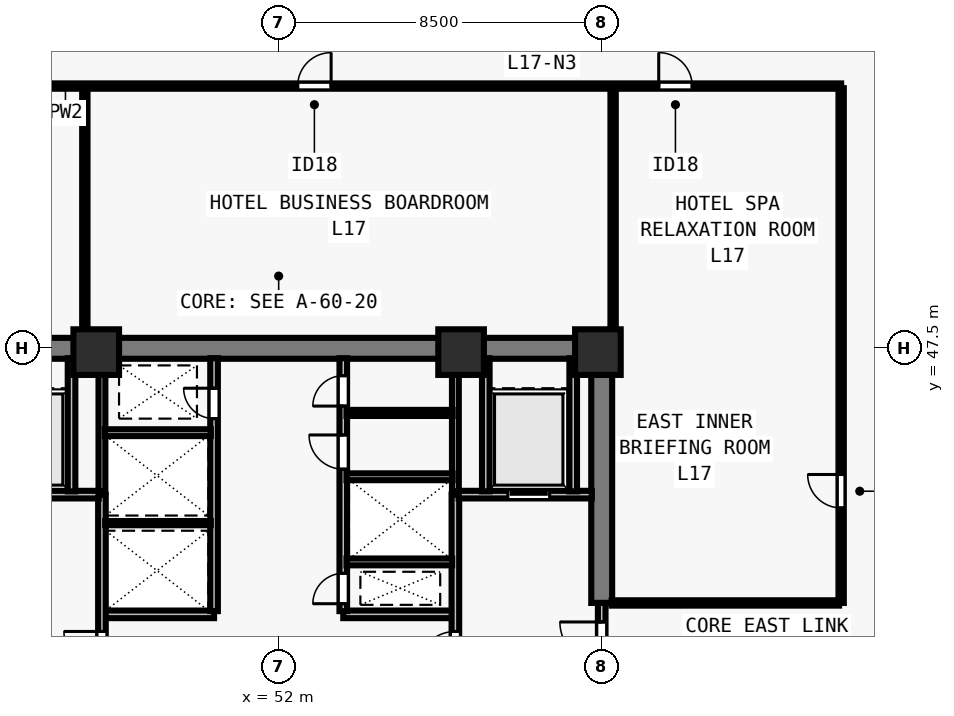
"""IFC4 building model, lengths in metres.
Left out: names, types, materials, properties, quantities, classifications, styles, units other than length and angle.
Written with IfcOpenShell. Run it as: python <this file> out.ifc"""

import sys

from ifc_helpers import new_model, si_unit, direction, frame, frame_2d, origin, origin_2d, place, context, subcontext, project, spatial, rectangle, extrude, element, fill, save


model = new_model("IFC4")
c1 = context("Model", 3, precision=1e-05, world=origin(), true_north=direction((0.0, 1.0)))
c2 = subcontext(c1, "Body", "Model", "MODEL_VIEW")
j1 = project(units=[si_unit("LENGTHUNIT", "METRE"), si_unit("PLANEANGLEUNIT", "RADIAN")], contexts=[c1])
p1 = place(None, origin())
s1 = spatial("IfcSite", under=j1, at=p1, CompositionType="ELEMENT")
p2 = place(p1, origin())
s2 = spatial("IfcBuilding", under=s1, at=p2, CompositionType="ELEMENT")
p3 = place(p2, frame((0.0, 0.0, 65.5)))
s3 = spatial("IfcBuildingStorey", under=s2, at=p3, CompositionType="ELEMENT", Elevation=65.5)
for number, where, z_axis, x_axis in (
    (1, (47.2, 47.4, 0.0), (0.0, 0.0, 1.0), (1.0, 0.0, 0.0)),
    (2, (56.8, 47.4, 0.0), (0.0, 0.0, 1.0), (1.0, 0.0, 0.0)),
    (3, (60.4, 47.4, 0.0), (0.0, 0.0, 1.0), (1.0, 0.0, 0.0)),
):
    element("IfcColumn", number, at=place(p3, frame(where, z_axis=z_axis, x_axis=x_axis)), inside=s3, PredefinedType="COLUMN", context=c2, shape_type="SweptSolid", body=[
        extrude(rectangle(XDim=1.2, YDim=1.2, at=origin_2d()), origin(), (0.0, 0.0, 1.0), 3.5),
    ])
p4 = place(p3, frame((43.225, 47.5, 0.0), z_axis=(0.0, 0.0, 1.0), x_axis=(1.0, 0.0, 0.0)))
e4 = element("IfcWall", 4, at=p4, inside=s3, PredefinedType="SHEAR", context=c2, shape_type="SweptSolid", body=[
    extrude(rectangle(XDim=17.55, YDim=0.55, at=frame_2d((8.775, 0.0))), origin(), (0.0, 0.0, 1.0), 3.28),
])
p5 = place(p3, frame((60.5, 40.8, 0.0), z_axis=(0.0, 0.0, 1.0), x_axis=(0.0, 1.0, 0.0)))
e5 = element("IfcWall", 5, at=p5, inside=s3, PredefinedType="SHEAR", context=c2, shape_type="SweptSolid", body=[
    extrude(rectangle(XDim=6.435, YDim=0.55, at=frame_2d((3.218, 0.0))), origin(), (0.0, 0.0, 1.0), 3.28),
])
for number, where, z_axis, x_axis in (
    (6, (47.35, 40.5, 0.0), (0.0, 0.0, 1.0), (1.0, 0.0, 0.0)),
    (7, (53.7, 40.5, 0.0), (0.0, 0.0, 1.0), (1.0, 0.0, 0.0)),
):
    element("IfcWall", number, at=place(p3, frame(where, z_axis=z_axis, x_axis=x_axis)), inside=s3, PredefinedType="SOLIDWALL", context=c2, shape_type="SweptSolid", body=[
        extrude(rectangle(XDim=2.95, YDim=0.2, at=frame_2d((1.475, 0.0))), origin(), (0.0, 0.0, 1.0), 3.28),
    ])
p6 = place(p3, frame((50.3, 40.585, 0.0), z_axis=(0.0, 0.0, 1.0), x_axis=(0.0, 1.0, 0.0)))
e8 = element("IfcWall", 8, at=p6, inside=s3, PredefinedType="SOLIDWALL", context=c2, shape_type="SweptSolid", body=[
    extrude(rectangle(XDim=6.655, YDim=0.2, at=frame_2d((3.328, 0.0))), origin(), (0.0, 0.0, 1.0), 3.28),
])
p7 = place(p6, frame((5.065, 0.0, 0.0)))
e9 = element("IfcOpeningElement", 9, at=p7, cuts=e8, PredefinedType="OPENING", context=c2, shape_type="SweptSolid", body=[
    extrude(rectangle(XDim=0.8, YDim=2.08, at=frame_2d((0.4, 1.04))), frame((0.0, 0.11, 0.0), z_axis=(0.0, -1.0, 0.0), x_axis=(1.0, 0.0, 0.0)), (0.0, 0.0, 1.0), 0.22),
])
p8 = place(p3, frame((53.7, 40.585, 0.0), z_axis=(0.0, 0.0, 1.0), x_axis=(0.0, 1.0, 0.0)))
e10 = element("IfcWall", 10, at=p8, inside=s3, PredefinedType="SOLIDWALL", context=c2, shape_type="SweptSolid", body=[
    extrude(rectangle(XDim=6.655, YDim=0.2, at=frame_2d((3.328, 0.0))), origin(), (0.0, 0.0, 1.0), 3.28),
])
p9 = place(p8, frame((0.195, 0.0, 0.0)))
e11 = element("IfcOpeningElement", 11, at=p9, cuts=e10, PredefinedType="OPENING", context=c2, shape_type="SweptSolid", body=[
    extrude(rectangle(XDim=0.8, YDim=2.08, at=frame_2d((0.4, 1.04))), frame((0.0, 0.11, 0.0), z_axis=(0.0, -1.0, 0.0), x_axis=(1.0, 0.0, 0.0)), (0.0, 0.0, 1.0), 0.22),
])
p10 = place(p8, frame((3.735, 0.0, 0.0)))
e12 = element("IfcOpeningElement", 12, at=p10, cuts=e10, PredefinedType="OPENING", context=c2, shape_type="SweptSolid", body=[
    extrude(rectangle(XDim=0.9, YDim=2.12, at=frame_2d((0.45, 1.06))), frame((0.0, 0.11, 0.0), z_axis=(0.0, -1.0, 0.0), x_axis=(1.0, 0.0, 0.0)), (0.0, 0.0, 1.0), 0.22),
])
p11 = place(p8, frame((5.395, 0.0, 0.0)))
e13 = element("IfcOpeningElement", 13, at=p11, cuts=e10, PredefinedType="OPENING", context=c2, shape_type="SweptSolid", body=[
    extrude(rectangle(XDim=0.8, YDim=2.1, at=frame_2d((0.4, 1.05))), frame((0.0, 0.11, 0.0), z_axis=(0.0, -1.0, 0.0), x_axis=(1.0, 0.0, 0.0)), (0.0, 0.0, 1.0), 0.22),
])
p12 = place(p3, frame((47.35, 38.785, 0.0), z_axis=(0.0, 0.0, 1.0), x_axis=(0.0, 1.0, 0.0)))
e14 = element("IfcWall", 14, at=p12, inside=s3, PredefinedType="SOLIDWALL", context=c2, shape_type="SweptSolid", body=[
    extrude(rectangle(XDim=4.865, YDim=0.2, at=frame_2d((2.433, 0.0))), origin(), (0.0, 0.0, 1.0), 3.28),
])
p13 = place(p12, frame((0.265, 0.0, 0.0)))
e15 = element("IfcOpeningElement", 15, at=p13, cuts=e14, PredefinedType="OPENING", context=c2, shape_type="SweptSolid", body=[
    extrude(rectangle(XDim=1.0, YDim=2.15, at=frame_2d((0.5, 1.075))), frame((0.0, 0.11, 0.0), z_axis=(0.0, -1.0, 0.0), x_axis=(1.0, 0.0, 0.0)), (0.0, 0.0, 1.0), 0.22),
])
p14 = place(p3, frame((43.76, 43.65, 0.0), z_axis=(0.0, 0.0, 1.0), x_axis=(1.0, 0.0, 0.0)))
e16 = element("IfcWall", 16, at=p14, inside=s3, PredefinedType="SOLIDWALL", context=c2, shape_type="SweptSolid", body=[
    extrude(rectangle(XDim=3.505, YDim=0.2, at=frame_2d((1.752, 0.0))), origin(), (0.0, 0.0, 1.0), 3.28),
])
p15 = place(p14, frame((1.11, 0.0, 0.0)))
e17 = element("IfcOpeningElement", 17, at=p15, cuts=e16, PredefinedType="OPENING", context=c2, shape_type="SweptSolid", body=[
    extrude(rectangle(XDim=1.1, YDim=2.2, at=frame_2d((0.55, 1.1))), frame((0.0, 0.11, 0.0), z_axis=(0.0, -1.0, 0.0), x_axis=(1.0, 0.0, 0.0)), (0.0, 0.0, 1.0), 0.22),
])
p16 = place(p3, frame((46.55, 43.735, 0.0), z_axis=(0.0, 0.0, 1.0), x_axis=(0.0, 1.0, 0.0)))
e18 = element("IfcWall", 18, at=p16, inside=s3, PredefinedType="SOLIDWALL", context=c2, shape_type="SweptSolid", body=[
    extrude(rectangle(XDim=3.505, YDim=0.2, at=frame_2d((1.752, 0.0))), origin(), (0.0, 0.0, 1.0), 3.28),
])
p17 = place(p3, frame((60.5, 38.75, 0.0), z_axis=(0.0, 0.0, 1.0), x_axis=(0.0, 1.0, 0.0)))
e19 = element("IfcWall", 19, at=p17, inside=s3, PredefinedType="SOLIDWALL", context=c2, shape_type="SweptSolid", body=[
    extrude(rectangle(XDim=2.05, YDim=0.2, at=frame_2d((1.025, 0.0))), origin(), (0.0, 0.0, 1.0), 3.28),
])
p18 = place(p17, frame((0.45, 0.0, 0.0)))
e20 = element("IfcOpeningElement", 20, at=p18, cuts=e19, PredefinedType="OPENING", context=c2, shape_type="SweptSolid", body=[
    extrude(rectangle(XDim=1.1, YDim=2.15, at=frame_2d((0.55, 1.075))), frame((0.0, 0.11, 0.0), z_axis=(0.0, -1.0, 0.0), x_axis=(1.0, 0.0, 0.0)), (0.0, 0.0, 1.0), 0.22),
])
p19 = place(p3, frame((56.65, 38.785, 0.0), z_axis=(0.0, 0.0, 1.0), x_axis=(0.0, 1.0, 0.0)))
e21 = element("IfcWall", 21, at=p19, inside=s3, PredefinedType="SOLIDWALL", context=c2, shape_type="SweptSolid", body=[
    extrude(rectangle(XDim=4.865, YDim=0.2, at=frame_2d((2.433, 0.0))), origin(), (0.0, 0.0, 1.0), 3.28),
])
p20 = place(p19, frame((0.265, 0.0, 0.0)))
e22 = element("IfcOpeningElement", 22, at=p20, cuts=e21, PredefinedType="OPENING", context=c2, shape_type="SweptSolid", body=[
    extrude(rectangle(XDim=1.0, YDim=2.15, at=frame_2d((0.5, 1.075))), frame((0.0, 0.11, 0.0), z_axis=(0.0, -1.0, 0.0), x_axis=(1.0, 0.0, 0.0)), (0.0, 0.0, 1.0), 0.22),
])
p21 = place(p3, frame((56.735, 43.65, 0.0), z_axis=(0.0, 0.0, 1.0), x_axis=(1.0, 0.0, 0.0)))
e23 = element("IfcWall", 23, at=p21, inside=s3, PredefinedType="SOLIDWALL", context=c2, shape_type="SweptSolid", body=[
    extrude(rectangle(XDim=3.505, YDim=0.2, at=frame_2d((1.752, 0.0))), origin(), (0.0, 0.0, 1.0), 3.28),
])
p22 = place(p21, frame((1.295, 0.0, 0.0)))
e24 = element("IfcOpeningElement", 24, at=p22, cuts=e23, PredefinedType="OPENING", context=c2, shape_type="SweptSolid", body=[
    extrude(rectangle(XDim=1.1, YDim=2.2, at=frame_2d((0.55, 1.1))), frame((0.0, 0.11, 0.0), z_axis=(0.0, -1.0, 0.0), x_axis=(1.0, 0.0, 0.0)), (0.0, 0.0, 1.0), 0.22),
])
for number, where, z_axis, x_axis in (
    (25, (57.45, 43.735, 0.0), (0.0, 0.0, 1.0), (0.0, 1.0, 0.0)),
    (26, (59.75, 43.735, 0.0), (0.0, 0.0, 1.0), (0.0, 1.0, 0.0)),
):
    element("IfcWall", number, at=place(p3, frame(where, z_axis=z_axis, x_axis=x_axis)), inside=s3, PredefinedType="SOLIDWALL", context=c2, shape_type="SweptSolid", body=[
        extrude(rectangle(XDim=3.505, YDim=0.2, at=frame_2d((1.752, 0.0))), origin(), (0.0, 0.0, 1.0), 3.28),
    ])
p23 = place(p3, frame((47.35, 43.735, 0.0), z_axis=(0.0, 0.0, 1.0), x_axis=(0.0, 1.0, 0.0)))
e27 = element("IfcWall", 27, at=p23, inside=s3, PredefinedType="SOLIDWALL", context=c2, shape_type="SweptSolid", body=[
    extrude(rectangle(XDim=3.505, YDim=0.18, at=frame_2d((1.752, 0.0))), origin(), (0.0, 0.0, 1.0), 3.28),
])
p24 = place(p3, frame((47.435, 42.9, 0.0), z_axis=(0.0, 0.0, 1.0), x_axis=(1.0, 0.0, 0.0)))
e28 = element("IfcWall", 28, at=p24, inside=s3, PredefinedType="PARTITIONING", context=c2, shape_type="SweptSolid", body=[
    extrude(rectangle(XDim=2.78, YDim=0.11, at=frame_2d((1.39, 0.0))), origin(), (0.0, 0.0, 1.0), 3.28),
])
p25 = place(p3, frame((47.425, 45.28, 0.0), z_axis=(0.0, 0.0, 1.0), x_axis=(1.0, 0.0, 0.0)))
e29 = element("IfcWall", 29, at=p25, inside=s3, PredefinedType="SOLIDWALL", context=c2, shape_type="SweptSolid", body=[
    extrude(rectangle(XDim=2.79, YDim=0.18, at=frame_2d((1.395, 0.0))), origin(), (0.0, 0.0, 1.0), 3.28),
])
p26 = place(p3, frame((56.65, 43.735, 0.0), z_axis=(0.0, 0.0, 1.0), x_axis=(0.0, 1.0, 0.0)))
e30 = element("IfcWall", 30, at=p26, inside=s3, PredefinedType="SOLIDWALL", context=c2, shape_type="SweptSolid", body=[
    extrude(rectangle(XDim=3.505, YDim=0.18, at=frame_2d((1.752, 0.0))), origin(), (0.0, 0.0, 1.0), 3.28),
])
p27 = place(p3, frame((53.785, 41.88, 0.0), z_axis=(0.0, 0.0, 1.0), x_axis=(1.0, 0.0, 0.0)))
e31 = element("IfcWall", 31, at=p27, inside=s3, PredefinedType="SOLIDWALL", context=c2, shape_type="SweptSolid", body=[
    extrude(rectangle(XDim=2.78, YDim=0.18, at=frame_2d((1.39, 0.0))), origin(), (0.0, 0.0, 1.0), 3.28),
])
p28 = place(p3, frame((53.785, 44.12, 0.0), z_axis=(0.0, 0.0, 1.0), x_axis=(1.0, 0.0, 0.0)))
e32 = element("IfcWall", 32, at=p28, inside=s3, PredefinedType="SOLIDWALL", context=c2, shape_type="SweptSolid", body=[
    extrude(rectangle(XDim=2.79, YDim=0.18, at=frame_2d((1.395, 0.0))), origin(), (0.0, 0.0, 1.0), 3.28),
])
p29 = place(p3, frame((53.785, 45.8, 0.0), z_axis=(0.0, 0.0, 1.0), x_axis=(1.0, 0.0, 0.0)))
e33 = element("IfcWall", 33, at=p29, inside=s3, PredefinedType="PARTITIONING", context=c2, shape_type="SweptSolid", body=[
    extrude(rectangle(XDim=2.79, YDim=0.16, at=frame_2d((1.395, 0.0))), origin(), (0.0, 0.0, 1.0), 3.28),
])
p30 = place(p3, frame((37.2, 54.4, 0.0), z_axis=(0.0, 0.0, 1.0), x_axis=(1.0, 0.0, 0.0)))
e34 = element("IfcWall", 34, at=p30, inside=s3, PredefinedType="PARTITIONING", context=c2, shape_type="SweptSolid", body=[
    extrude(rectangle(XDim=29.6, YDim=0.14, at=frame_2d((14.8, 0.0))), origin(), (0.0, 0.0, 1.0), 3.28),
])
p31 = place(p30, frame((2.2, 0.0, 0.0)))
e35 = element("IfcOpeningElement", 35, at=p31, cuts=e34, PredefinedType="OPENING", context=c2, shape_type="SweptSolid", body=[
    extrude(rectangle(XDim=0.88, YDim=2.1, at=frame_2d((0.44, 1.05))), frame((0.0, 0.08, 0.0), z_axis=(0.0, -1.0, 0.0), x_axis=(1.0, 0.0, 0.0)), (0.0, 0.0, 1.0), 0.16),
])
p32 = place(p30, frame((15.3, 0.0, 0.0)))
e36 = element("IfcOpeningElement", 36, at=p32, cuts=e34, PredefinedType="OPENING", context=c2, shape_type="SweptSolid", body=[
    extrude(rectangle(XDim=0.88, YDim=2.1, at=frame_2d((0.44, 1.05))), frame((0.0, 0.08, 0.0), z_axis=(0.0, -1.0, 0.0), x_axis=(1.0, 0.0, 0.0)), (0.0, 0.0, 1.0), 0.16),
])
p33 = place(p30, frame((24.8, 0.0, 0.0)))
e37 = element("IfcOpeningElement", 37, at=p33, cuts=e34, PredefinedType="OPENING", context=c2, shape_type="SweptSolid", body=[
    extrude(rectangle(XDim=0.88, YDim=2.1, at=frame_2d((0.44, 1.05))), frame((0.0, 0.08, 0.0), z_axis=(0.0, -1.0, 0.0), x_axis=(1.0, 0.0, 0.0)), (0.0, 0.0, 1.0), 0.16),
])
p34 = place(p3, frame((66.8, 40.8, 0.0), z_axis=(0.0, 0.0, 1.0), x_axis=(0.0, 1.0, 0.0)))
e38 = element("IfcWall", 38, at=p34, inside=s3, PredefinedType="PARTITIONING", context=c2, shape_type="SweptSolid", body=[
    extrude(rectangle(XDim=13.545, YDim=0.14, at=frame_2d((6.772, 0.0))), origin(), (0.0, 0.0, 1.0), 3.28),
])
p35 = place(p34, frame((2.5, 0.0, 0.0)))
e39 = element("IfcOpeningElement", 39, at=p35, cuts=e38, PredefinedType="OPENING", context=c2, shape_type="SweptSolid", body=[
    extrude(rectangle(XDim=0.88, YDim=2.1, at=frame_2d((0.44, 1.05))), frame((0.0, 0.08, 0.0), z_axis=(0.0, -1.0, 0.0), x_axis=(1.0, 0.0, 0.0)), (0.0, 0.0, 1.0), 0.16),
])
p36 = place(p3, frame((60.76, 40.8, 0.0), z_axis=(0.0, 0.0, 1.0), x_axis=(1.0, 0.0, 0.0)))
e40 = element("IfcWall", 40, at=p36, inside=s3, PredefinedType="PARTITIONING", context=c2, shape_type="SweptSolid", body=[
    extrude(rectangle(XDim=5.985, YDim=0.14, at=frame_2d((2.993, 0.0))), origin(), (0.0, 0.0, 1.0), 3.28),
])
p37 = place(p3, frame((46.9, 47.76, 0.0), z_axis=(0.0, 0.0, 1.0), x_axis=(0.0, 1.0, 0.0)))
e41 = element("IfcWall", 41, at=p37, inside=s3, PredefinedType="PARTITIONING", context=c2, shape_type="SweptSolid", body=[
    extrude(rectangle(XDim=6.585, YDim=0.14, at=frame_2d((3.292, 0.0))), origin(), (0.0, 0.0, 1.0), 3.28),
])
p38 = place(p3, frame((60.8, 47.76, 0.0), z_axis=(0.0, 0.0, 1.0), x_axis=(0.0, 1.0, 0.0)))
e42 = element("IfcWall", 42, at=p38, inside=s3, PredefinedType="PARTITIONING", context=c2, shape_type="SweptSolid", body=[
    extrude(rectangle(XDim=6.585, YDim=0.14, at=frame_2d((3.292, 0.0))), origin(), (0.0, 0.0, 1.0), 2.439),
])
p39 = place(p13, origin())
e43 = element("IfcDoor", 43, at=p39, inside=s3, OperationType="SINGLE_SWING_RIGHT", PredefinedType="DOOR", context=c2, shape_type="SweptSolid", body=[
    extrude(rectangle(XDim=1.0, YDim=2.15, at=frame_2d((0.5, 1.075))), frame((0.0, 0.025, 0.0), z_axis=(0.0, -1.0, 0.0), x_axis=(1.0, 0.0, 0.0)), (0.0, 0.0, 1.0), 0.05),
])
fill(e15, e43)
p40 = place(p18, origin())
e44 = element("IfcDoor", 44, at=p40, inside=s3, OperationType="SINGLE_SWING_RIGHT", PredefinedType="DOOR", context=c2, shape_type="SweptSolid", body=[
    extrude(rectangle(XDim=1.1, YDim=2.15, at=frame_2d((0.55, 1.075))), frame((0.0, 0.025, 0.0), z_axis=(0.0, -1.0, 0.0), x_axis=(1.0, 0.0, 0.0)), (0.0, 0.0, 1.0), 0.05),
])
fill(e20, e44)
p41 = place(p20, origin())
e45 = element("IfcDoor", 45, at=p41, inside=s3, OperationType="SINGLE_SWING_LEFT", PredefinedType="DOOR", context=c2, shape_type="SweptSolid", body=[
    extrude(rectangle(XDim=1.0, YDim=2.15, at=frame_2d((0.5, 1.075))), frame((0.0, 0.025, 0.0), z_axis=(0.0, -1.0, 0.0), x_axis=(1.0, 0.0, 0.0)), (0.0, 0.0, 1.0), 0.05),
])
fill(e22, e45)
p42 = place(p22, origin())
e46 = element("IfcDoor", 46, at=p42, inside=s3, OperationType="SLIDING_TO_LEFT", PredefinedType="DOOR", context=c2, shape_type="SweptSolid", body=[
    extrude(rectangle(XDim=1.1, YDim=2.2, at=frame_2d((0.55, 1.1))), frame((0.0, 0.025, 0.0), z_axis=(0.0, -1.0, 0.0), x_axis=(1.0, 0.0, 0.0)), (0.0, 0.0, 1.0), 0.05),
])
fill(e24, e46)
p43 = place(p7, origin())
e47 = element("IfcDoor", 47, at=p43, inside=s3, OperationType="SINGLE_SWING_RIGHT", PredefinedType="DOOR", context=c2, shape_type="SweptSolid", body=[
    extrude(rectangle(XDim=0.8, YDim=2.08, at=frame_2d((0.4, 1.04))), frame((0.0, 0.025, 0.0), z_axis=(0.0, -1.0, 0.0), x_axis=(1.0, 0.0, 0.0)), (0.0, 0.0, 1.0), 0.05),
])
fill(e9, e47)
p44 = place(p9, origin())
e48 = element("IfcDoor", 48, at=p44, inside=s3, OperationType="SINGLE_SWING_LEFT", PredefinedType="DOOR", context=c2, shape_type="SweptSolid", body=[
    extrude(rectangle(XDim=0.8, YDim=2.08, at=frame_2d((0.4, 1.04))), frame((0.0, 0.025, 0.0), z_axis=(0.0, -1.0, 0.0), x_axis=(1.0, 0.0, 0.0)), (0.0, 0.0, 1.0), 0.05),
])
fill(e11, e48)
p45 = place(p10, origin())
e49 = element("IfcDoor", 49, at=p45, inside=s3, OperationType="SINGLE_SWING_RIGHT", PredefinedType="DOOR", context=c2, shape_type="SweptSolid", body=[
    extrude(rectangle(XDim=0.9, YDim=2.12, at=frame_2d((0.45, 1.06))), frame((0.0, 0.025, 0.0), z_axis=(0.0, -1.0, 0.0), x_axis=(1.0, 0.0, 0.0)), (0.0, 0.0, 1.0), 0.05),
])
fill(e12, e49)
p46 = place(p11, origin())
e50 = element("IfcDoor", 50, at=p46, inside=s3, OperationType="SINGLE_SWING_LEFT", PredefinedType="DOOR", context=c2, shape_type="SweptSolid", body=[
    extrude(rectangle(XDim=0.8, YDim=2.1, at=frame_2d((0.4, 1.05))), frame((0.0, 0.025, 0.0), z_axis=(0.0, -1.0, 0.0), x_axis=(1.0, 0.0, 0.0)), (0.0, 0.0, 1.0), 0.05),
])
fill(e13, e50)
p47 = place(p32, origin())
e51 = element("IfcDoor", 51, at=p47, inside=s3, OperationType="SINGLE_SWING_RIGHT", PredefinedType="DOOR", context=c2, shape_type="SweptSolid", body=[
    extrude(rectangle(XDim=0.88, YDim=2.1, at=frame_2d((0.44, 1.05))), frame((0.0, 0.025, 0.0), z_axis=(0.0, -1.0, 0.0), x_axis=(1.0, 0.0, 0.0)), (0.0, 0.0, 1.0), 0.05),
])
fill(e36, e51)
p48 = place(p33, origin())
e52 = element("IfcDoor", 52, at=p48, inside=s3, OperationType="SINGLE_SWING_LEFT", PredefinedType="DOOR", context=c2, shape_type="SweptSolid", body=[
    extrude(rectangle(XDim=0.88, YDim=2.1, at=frame_2d((0.44, 1.05))), frame((0.0, 0.025, 0.0), z_axis=(0.0, -1.0, 0.0), x_axis=(1.0, 0.0, 0.0)), (0.0, 0.0, 1.0), 0.05),
])
fill(e37, e52)
p49 = place(p35, origin())
e53 = element("IfcDoor", 53, at=p49, inside=s3, OperationType="SINGLE_SWING_RIGHT", PredefinedType="DOOR", context=c2, shape_type="SweptSolid", body=[
    extrude(rectangle(XDim=0.88, YDim=2.1, at=frame_2d((0.44, 1.05))), frame((0.0, 0.025, 0.0), z_axis=(0.0, -1.0, 0.0), x_axis=(1.0, 0.0, 0.0)), (0.0, 0.0, 1.0), 0.05),
])
fill(e39, e53)
save(model, sys.argv[1])
